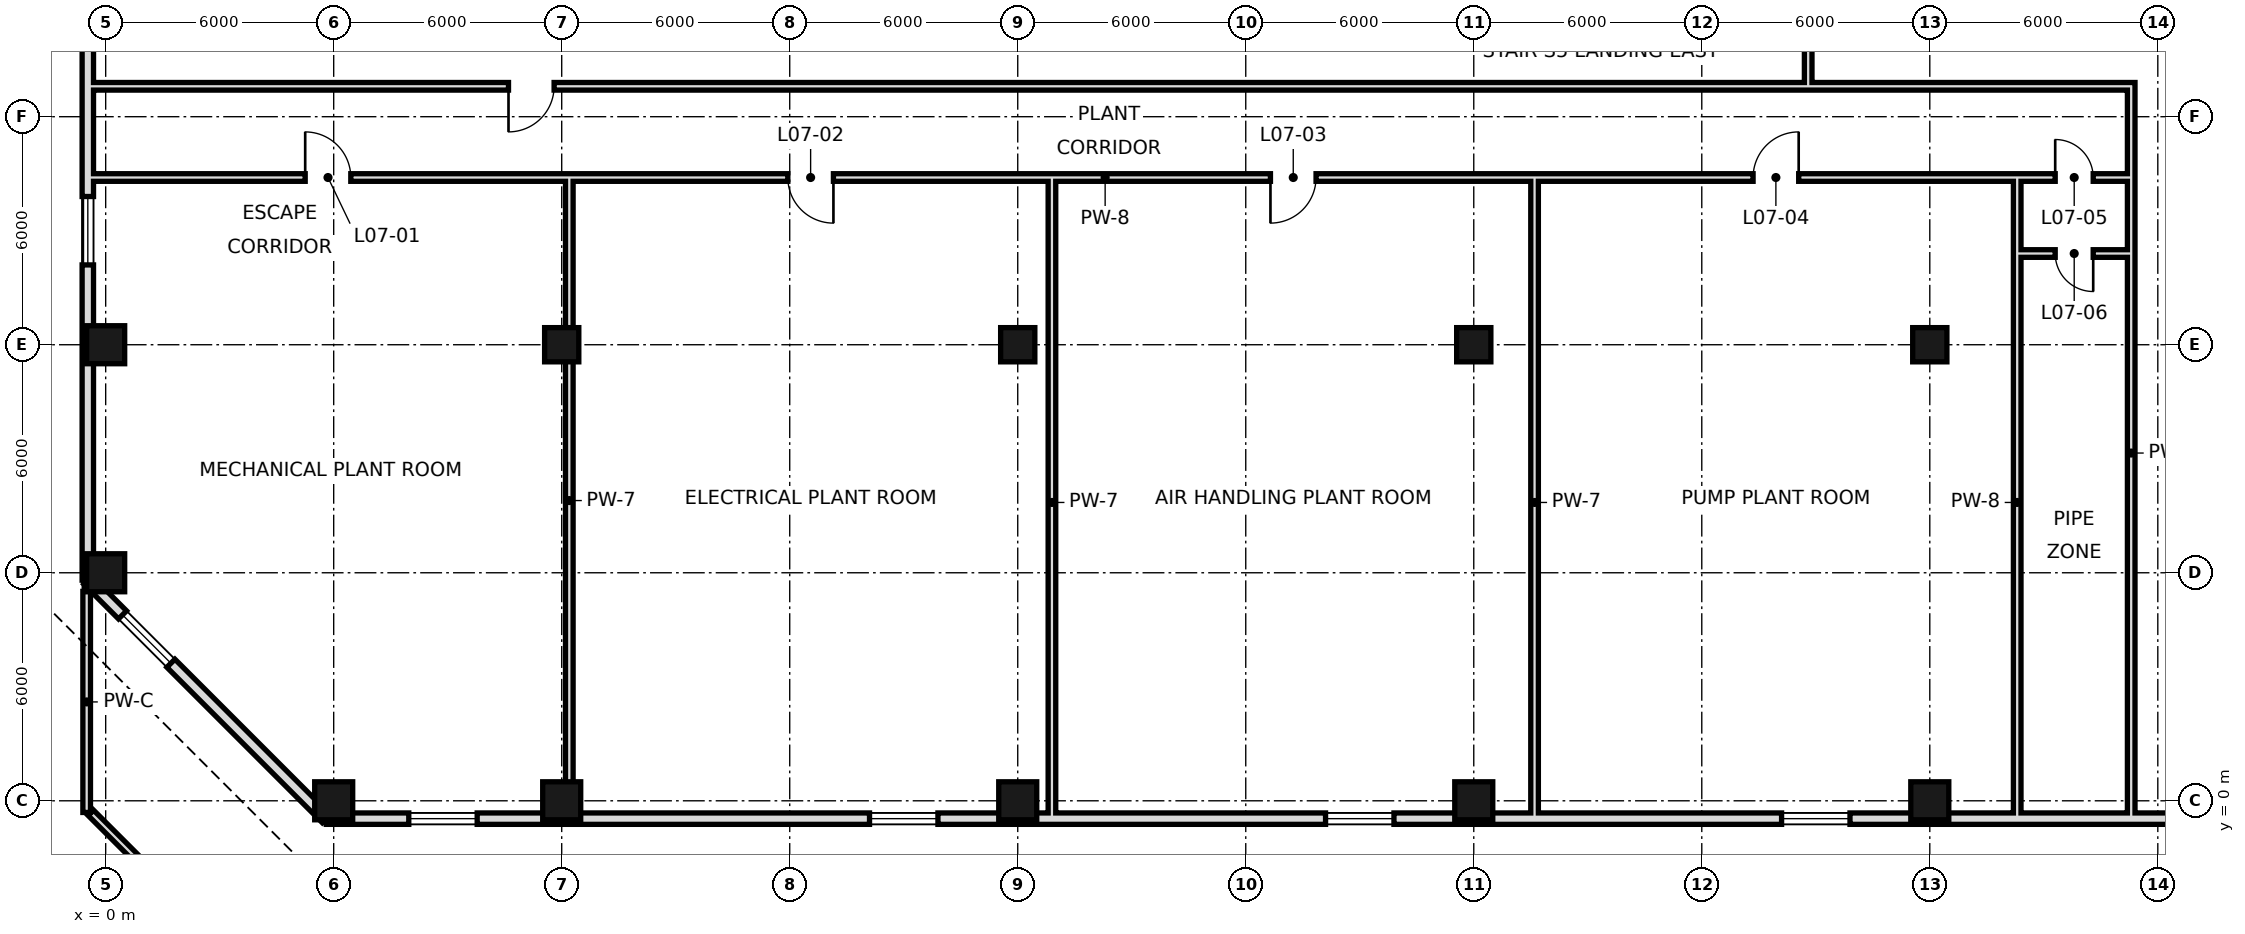
"""IFC4 building model, lengths in metres.
Left out: names, types, materials, properties, quantities, classifications, styles, units other than length and angle.
Written with IfcOpenShell. Run it as: python <this file> out.ifc"""

import sys

from ifc_helpers import new_model, si_unit, direction, frame, frame_2d, origin, origin_2d, place, context, subcontext, project, spatial, rectangle, hollow_rectangle, extrude, element, fill, save


model = new_model("IFC4")
c1 = context("Model", 3, precision=1e-05, world=origin(), true_north=direction((0.0, 1.0)))
c2 = subcontext(c1, "Body", "Model", "MODEL_VIEW")
j1 = project(units=[si_unit("LENGTHUNIT", "METRE"), si_unit("PLANEANGLEUNIT", "RADIAN")], contexts=[c1])
p1 = place(None, origin())
s1 = spatial("IfcSite", under=j1, at=p1, CompositionType="ELEMENT")
p2 = place(p1, origin())
s2 = spatial("IfcBuilding", under=s1, at=p2, CompositionType="ELEMENT")
p3 = place(p2, frame((0.0, 0.0, 44.4)))
s3 = spatial("IfcBuildingStorey", under=s2, at=p3, CompositionType="ELEMENT", Elevation=44.4)
for number, where, z_axis, x_axis in (
    (1, (0.0, 6.0, 0.0), (0.0, 0.0, 1.0), (1.0, 0.0, 0.0)),
    (2, (0.0, 12.0, 0.0), (0.0, 0.0, 1.0), (1.0, 0.0, 0.0)),
    (3, (6.0, 0.0, 0.0), (0.0, 0.0, 1.0), (1.0, 0.0, 0.0)),
    (4, (12.0, 0.0, 0.0), (0.0, 0.0, 1.0), (1.0, 0.0, 0.0)),
):
    element("IfcColumn", number, at=place(p3, frame(where, z_axis=z_axis, x_axis=x_axis)), inside=s3, PredefinedType="COLUMN", context=c2, shape_type="SweptSolid", body=[
        extrude(hollow_rectangle(XDim=1.0, YDim=1.0, WallThickness=0.05, at=origin_2d()), origin(), (0.0, 0.0, 1.0), 5.4),
    ])
p4 = place(p3, frame((12.0, 12.0, 0.0), z_axis=(0.0, 0.0, 1.0), x_axis=(1.0, 0.0, 0.0)))
e5 = element("IfcColumn", 5, at=p4, inside=s3, PredefinedType="COLUMN", context=c2, shape_type="SweptSolid", body=[
    extrude(hollow_rectangle(XDim=0.9, YDim=0.9, WallThickness=0.045, at=origin_2d()), origin(), (0.0, 0.0, 1.0), 5.4),
])
p5 = place(p3, frame((24.0, 0.0, 0.0), z_axis=(0.0, 0.0, 1.0), x_axis=(1.0, 0.0, 0.0)))
e6 = element("IfcColumn", 6, at=p5, inside=s3, PredefinedType="COLUMN", context=c2, shape_type="SweptSolid", body=[
    extrude(hollow_rectangle(XDim=1.0, YDim=1.0, WallThickness=0.05, at=origin_2d()), origin(), (0.0, 0.0, 1.0), 5.4),
])
p6 = place(p3, frame((24.0, 12.0, 0.0), z_axis=(0.0, 0.0, 1.0), x_axis=(1.0, 0.0, 0.0)))
e7 = element("IfcColumn", 7, at=p6, inside=s3, PredefinedType="COLUMN", context=c2, shape_type="SweptSolid", body=[
    extrude(hollow_rectangle(XDim=0.9, YDim=0.9, WallThickness=0.045, at=origin_2d()), origin(), (0.0, 0.0, 1.0), 5.4),
])
p7 = place(p3, frame((36.0, 0.0, 0.0), z_axis=(0.0, 0.0, 1.0), x_axis=(1.0, 0.0, 0.0)))
e8 = element("IfcColumn", 8, at=p7, inside=s3, PredefinedType="COLUMN", context=c2, shape_type="SweptSolid", body=[
    extrude(hollow_rectangle(XDim=1.0, YDim=1.0, WallThickness=0.05, at=origin_2d()), origin(), (0.0, 0.0, 1.0), 5.4),
])
p8 = place(p3, frame((36.0, 12.0, 0.0), z_axis=(0.0, 0.0, 1.0), x_axis=(1.0, 0.0, 0.0)))
e9 = element("IfcColumn", 9, at=p8, inside=s3, PredefinedType="COLUMN", context=c2, shape_type="SweptSolid", body=[
    extrude(hollow_rectangle(XDim=0.9, YDim=0.9, WallThickness=0.045, at=origin_2d()), origin(), (0.0, 0.0, 1.0), 5.4),
])
p9 = place(p3, frame((48.0, 0.0, 0.0), z_axis=(0.0, 0.0, 1.0), x_axis=(1.0, 0.0, 0.0)))
e10 = element("IfcColumn", 10, at=p9, inside=s3, PredefinedType="COLUMN", context=c2, shape_type="SweptSolid", body=[
    extrude(hollow_rectangle(XDim=1.0, YDim=1.0, WallThickness=0.05, at=origin_2d()), origin(), (0.0, 0.0, 1.0), 5.4),
])
p10 = place(p3, frame((48.0, 12.0, 0.0), z_axis=(0.0, 0.0, 1.0), x_axis=(1.0, 0.0, 0.0)))
e11 = element("IfcColumn", 11, at=p10, inside=s3, PredefinedType="COLUMN", context=c2, shape_type="SweptSolid", body=[
    extrude(hollow_rectangle(XDim=0.9, YDim=0.9, WallThickness=0.045, at=origin_2d()), origin(), (0.0, 0.0, 1.0), 5.4),
])
p11 = place(p3, frame((5.805, -0.47, 0.0), z_axis=(0.0, 0.0, 1.0), x_axis=(1.0, 0.0, 0.0)))
e12 = element("IfcWall", 12, at=p11, inside=s3, PredefinedType="SOLIDWALL", context=c2, shape_type="SweptSolid", body=[
    extrude(rectangle(XDim=54.389, YDim=0.3, at=frame_2d((27.195, 0.0))), origin(), (0.0, 0.0, 1.0), 5.22),
])
p12 = place(p11, frame((2.17, 0.0, 0.9)))
e13 = element("IfcOpeningElement", 13, at=p12, cuts=e12, PredefinedType="OPENING", context=c2, shape_type="SweptSolid", body=[
    extrude(rectangle(XDim=1.8, YDim=1.5, at=frame_2d((0.9, 0.75))), frame((0.0, 0.16, 0.0), z_axis=(0.0, -1.0, 0.0), x_axis=(1.0, 0.0, 0.0)), (0.0, 0.0, 1.0), 0.32),
])
p13 = place(p11, frame((14.295, 0.0, 0.9)))
e14 = element("IfcOpeningElement", 14, at=p13, cuts=e12, PredefinedType="OPENING", context=c2, shape_type="SweptSolid", body=[
    extrude(rectangle(XDim=1.8, YDim=1.5, at=frame_2d((0.9, 0.75))), frame((0.0, 0.16, 0.0), z_axis=(0.0, -1.0, 0.0), x_axis=(1.0, 0.0, 0.0)), (0.0, 0.0, 1.0), 0.32),
])
p14 = place(p11, frame((26.295, 0.0, 0.9)))
e15 = element("IfcOpeningElement", 15, at=p14, cuts=e12, PredefinedType="OPENING", context=c2, shape_type="SweptSolid", body=[
    extrude(rectangle(XDim=1.8, YDim=1.5, at=frame_2d((0.9, 0.75))), frame((0.0, 0.16, 0.0), z_axis=(0.0, -1.0, 0.0), x_axis=(1.0, 0.0, 0.0)), (0.0, 0.0, 1.0), 0.32),
])
p15 = place(p11, frame((38.295, 0.0, 0.9)))
e16 = element("IfcOpeningElement", 16, at=p15, cuts=e12, PredefinedType="OPENING", context=c2, shape_type="SweptSolid", body=[
    extrude(rectangle(XDim=1.8, YDim=1.5, at=frame_2d((0.9, 0.75))), frame((0.0, 0.16, 0.0), z_axis=(0.0, -1.0, 0.0), x_axis=(1.0, 0.0, 0.0)), (0.0, 0.0, 1.0), 0.32),
])
p16 = place(p11, frame((50.419, 0.0, 0.9)))
e17 = element("IfcOpeningElement", 17, at=p16, cuts=e12, PredefinedType="OPENING", context=c2, shape_type="SweptSolid", body=[
    extrude(rectangle(XDim=1.8, YDim=1.5, at=frame_2d((0.9, 0.75))), frame((0.0, 0.16, 0.0), z_axis=(0.0, -1.0, 0.0), x_axis=(1.0, 0.0, 0.0)), (0.0, 0.0, 1.0), 0.32),
])
p17 = place(p3, frame((-0.47, 42.195, 0.0), z_axis=(0.0, 0.0, 1.0), x_axis=(0.0, -1.0, 0.0)))
e18 = element("IfcWall", 18, at=p17, inside=s3, PredefinedType="SOLIDWALL", context=c2, shape_type="SweptSolid", body=[
    extrude(rectangle(XDim=36.389, YDim=0.3, at=frame_2d((18.195, 0.0))), origin(), (0.0, 0.0, 1.0), 5.22),
])
p18 = place(p17, frame((2.17, 0.0, 0.9)))
e19 = element("IfcOpeningElement", 19, at=p18, cuts=e18, PredefinedType="OPENING", context=c2, shape_type="SweptSolid", body=[
    extrude(rectangle(XDim=1.8, YDim=1.5, at=frame_2d((0.9, 0.75))), frame((0.0, 0.16, 0.0), z_axis=(0.0, -1.0, 0.0), x_axis=(1.0, 0.0, 0.0)), (0.0, 0.0, 1.0), 0.32),
])
p19 = place(p17, frame((14.295, 0.0, 0.9)))
e20 = element("IfcOpeningElement", 20, at=p19, cuts=e18, PredefinedType="OPENING", context=c2, shape_type="SweptSolid", body=[
    extrude(rectangle(XDim=1.8, YDim=1.5, at=frame_2d((0.9, 0.75))), frame((0.0, 0.16, 0.0), z_axis=(0.0, -1.0, 0.0), x_axis=(1.0, 0.0, 0.0)), (0.0, 0.0, 1.0), 0.32),
])
p20 = place(p17, frame((26.295, 0.0, 0.9)))
e21 = element("IfcOpeningElement", 21, at=p20, cuts=e18, PredefinedType="OPENING", context=c2, shape_type="SweptSolid", body=[
    extrude(rectangle(XDim=1.8, YDim=1.5, at=frame_2d((0.9, 0.75))), frame((0.0, 0.16, 0.0), z_axis=(0.0, -1.0, 0.0), x_axis=(1.0, 0.0, 0.0)), (0.0, 0.0, 1.0), 0.32),
])
p21 = place(p3, frame((-0.47, 5.805, 0.0), z_axis=(0.0, 0.0, 1.0), x_axis=(0.707106781187, -0.707106781187, 0.0)))
e22 = element("IfcWall", 22, at=p21, inside=s3, PredefinedType="SOLIDWALL", context=c2, shape_type="SweptSolid", body=[
    extrude(rectangle(XDim=8.875, YDim=0.3, at=frame_2d((4.438, 0.0))), origin(), (0.0, 0.0, 1.0), 5.22),
])
p22 = place(p21, frame((1.292, 0.0, 0.9)))
e23 = element("IfcOpeningElement", 23, at=p22, cuts=e22, PredefinedType="OPENING", context=c2, shape_type="SweptSolid", body=[
    extrude(rectangle(XDim=1.8, YDim=1.5, at=frame_2d((0.9, 0.75))), frame((0.0, 0.16, 0.0), z_axis=(0.0, -1.0, 0.0), x_axis=(1.0, 0.0, 0.0)), (0.0, 0.0, 1.0), 0.32),
])
p23 = place(p3, frame((5.69, -6.397, 0.0), z_axis=(0.0, 0.0, 1.0), x_axis=(-0.707106781187, 0.707106781187, 0.0)))
e24 = element("IfcWall", 24, at=p23, inside=s3, PredefinedType="PARAPET", context=c2, shape_type="SweptSolid", body=[
    extrude(rectangle(XDim=8.61, YDim=0.2, at=frame_2d((4.305, 0.0))), origin(), (0.0, 0.0, 1.0), 1.1),
])
p24 = place(p3, frame((-0.5, -0.307, 0.0), z_axis=(0.0, 0.0, 1.0), x_axis=(0.0, 1.0, 0.0)))
e25 = element("IfcWall", 25, at=p24, inside=s3, PredefinedType="PARAPET", context=c2, shape_type="SweptSolid", body=[
    extrude(rectangle(XDim=5.817, YDim=0.2, at=frame_2d((2.909, 0.0))), origin(), (0.0, 0.0, 1.0), 1.1),
])
p25 = place(p3, frame((12.2, -0.5, 0.0), z_axis=(0.0, 0.0, 1.0), x_axis=(0.0, 1.0, 0.0)))
e26 = element("IfcWall", 26, at=p25, inside=s3, PredefinedType="SOLIDWALL", context=c2, shape_type="SweptSolid", body=[
    extrude(rectangle(XDim=16.8, YDim=0.2, at=frame_2d((8.4, 0.0))), origin(), (0.0, 0.0, 1.0), 4.52),
])
for number, where, z_axis, x_axis in (
    (27, (24.9, -0.6, 0.0), (0.0, 0.0, 1.0), (0.0, 1.0, 0.0)),
    (28, (37.6, -0.6, 0.0), (0.0, 0.0, 1.0), (0.0, 1.0, 0.0)),
):
    element("IfcWall", number, at=place(p3, frame(where, z_axis=z_axis, x_axis=x_axis)), inside=s3, PredefinedType="SOLIDWALL", context=c2, shape_type="SweptSolid", body=[
        extrude(rectangle(XDim=16.9, YDim=0.2, at=frame_2d((8.45, 0.0))), origin(), (0.0, 0.0, 1.0), 4.52),
    ])
p26 = place(p3, frame((44.8, 18.9, 0.0), z_axis=(0.0, 0.0, 1.0), x_axis=(0.0, 1.0, 0.0)))
e29 = element("IfcWall", 29, at=p26, inside=s3, PredefinedType="SOLIDWALL", context=c2, shape_type="SweptSolid", body=[
    extrude(rectangle(XDim=29.7, YDim=0.2, at=frame_2d((14.85, 0.0))), origin(), (0.0, 0.0, 1.0), 4.52),
])
p27 = place(p26, frame((18.3, 0.0, 0.0)))
e30 = element("IfcOpeningElement", 30, at=p27, cuts=e29, PredefinedType="OPENING", context=c2, shape_type="SweptSolid", body=[
    extrude(rectangle(XDim=1.2, YDim=2.4, at=frame_2d((0.6, 1.2))), frame((0.0, 0.11, 0.0), z_axis=(0.0, -1.0, 0.0), x_axis=(1.0, 0.0, 0.0)), (0.0, 0.0, 1.0), 0.22),
])
p28 = place(p3, frame((50.3, -0.6, 0.0), z_axis=(0.0, 0.0, 1.0), x_axis=(0.0, 1.0, 0.0)))
e31 = element("IfcWall", 31, at=p28, inside=s3, PredefinedType="SOLIDWALL", context=c2, shape_type="SweptSolid", body=[
    extrude(rectangle(XDim=16.9, YDim=0.2, at=frame_2d((8.45, 0.0))), origin(), (0.0, 0.0, 1.0), 4.32),
])
p29 = place(p3, frame((53.3, -0.6, 0.0), z_axis=(0.0, 0.0, 1.0), x_axis=(0.0, 1.0, 0.0)))
e32 = element("IfcWall", 32, at=p29, inside=s3, PredefinedType="SOLIDWALL", context=c2, shape_type="SweptSolid", body=[
    extrude(rectangle(XDim=19.5, YDim=0.2, at=frame_2d((9.75, 0.0))), origin(), (0.0, 0.0, 1.0), 4.32),
])
p30 = place(p3, frame((50.4, 14.4, 0.0), z_axis=(0.0, 0.0, 1.0), x_axis=(1.0, 0.0, 0.0)))
e33 = element("IfcWall", 33, at=p30, inside=s3, PredefinedType="SOLIDWALL", context=c2, shape_type="SweptSolid", body=[
    extrude(rectangle(XDim=2.8, YDim=0.2, at=frame_2d((1.4, 0.0))), origin(), (0.0, 0.0, 1.0), 5.22),
])
p31 = place(p30, frame((0.9, 0.0, 0.0)))
e34 = element("IfcOpeningElement", 34, at=p31, cuts=e33, PredefinedType="OPENING", context=c2, shape_type="SweptSolid", body=[
    extrude(rectangle(XDim=1.0, YDim=2.4, at=frame_2d((0.5, 1.2))), frame((0.0, 0.11, 0.0), z_axis=(0.0, -1.0, 0.0), x_axis=(1.0, 0.0, 0.0)), (0.0, 0.0, 1.0), 0.22),
])
p32 = place(p3, frame((-0.6, 16.4, 0.0), z_axis=(0.0, 0.0, 1.0), x_axis=(1.0, 0.0, 0.0)))
e35 = element("IfcWall", 35, at=p32, inside=s3, PredefinedType="SOLIDWALL", context=c2, shape_type="SweptSolid", body=[
    extrude(rectangle(XDim=53.8, YDim=0.2, at=frame_2d((26.9, 0.0))), origin(), (0.0, 0.0, 1.0), 4.52),
])
p33 = place(p32, frame((5.85, 0.0, 0.0)))
e36 = element("IfcOpeningElement", 36, at=p33, cuts=e35, PredefinedType="OPENING", context=c2, shape_type="SweptSolid", body=[
    extrude(rectangle(XDim=1.2, YDim=2.4, at=frame_2d((0.6, 1.2))), frame((0.0, 0.11, 0.0), z_axis=(0.0, -1.0, 0.0), x_axis=(1.0, 0.0, 0.0)), (0.0, 0.0, 1.0), 0.22),
])
p34 = place(p32, frame((18.55, 0.0, 0.0)))
e37 = element("IfcOpeningElement", 37, at=p34, cuts=e35, PredefinedType="OPENING", context=c2, shape_type="SweptSolid", body=[
    extrude(rectangle(XDim=1.2, YDim=2.4, at=frame_2d((0.6, 1.2))), frame((0.0, 0.11, 0.0), z_axis=(0.0, -1.0, 0.0), x_axis=(1.0, 0.0, 0.0)), (0.0, 0.0, 1.0), 0.22),
])
p35 = place(p32, frame((31.25, 0.0, 0.0)))
e38 = element("IfcOpeningElement", 38, at=p35, cuts=e35, PredefinedType="OPENING", context=c2, shape_type="SweptSolid", body=[
    extrude(rectangle(XDim=1.2, YDim=2.4, at=frame_2d((0.6, 1.2))), frame((0.0, 0.11, 0.0), z_axis=(0.0, -1.0, 0.0), x_axis=(1.0, 0.0, 0.0)), (0.0, 0.0, 1.0), 0.22),
])
p36 = place(p32, frame((43.95, 0.0, 0.0)))
e39 = element("IfcOpeningElement", 39, at=p36, cuts=e35, PredefinedType="OPENING", context=c2, shape_type="SweptSolid", body=[
    extrude(rectangle(XDim=1.2, YDim=2.4, at=frame_2d((0.6, 1.2))), frame((0.0, 0.11, 0.0), z_axis=(0.0, -1.0, 0.0), x_axis=(1.0, 0.0, 0.0)), (0.0, 0.0, 1.0), 0.22),
])
p37 = place(p32, frame((51.9, 0.0, 0.0)))
e40 = element("IfcOpeningElement", 40, at=p37, cuts=e35, PredefinedType="OPENING", context=c2, shape_type="SweptSolid", body=[
    extrude(rectangle(XDim=1.0, YDim=2.4, at=frame_2d((0.5, 1.2))), frame((0.0, 0.11, 0.0), z_axis=(0.0, -1.0, 0.0), x_axis=(1.0, 0.0, 0.0)), (0.0, 0.0, 1.0), 0.22),
])
p38 = place(p3, frame((-0.6, 18.8, 0.0), z_axis=(0.0, 0.0, 1.0), x_axis=(1.0, 0.0, 0.0)))
e41 = element("IfcWall", 41, at=p38, inside=s3, PredefinedType="SOLIDWALL", context=c2, shape_type="SweptSolid", body=[
    extrude(rectangle(XDim=53.8, YDim=0.2, at=frame_2d((26.9, 0.0))), origin(), (0.0, 0.0, 1.0), 4.52),
])
p39 = place(p38, frame((11.2, 0.0, 0.0)))
e42 = element("IfcOpeningElement", 42, at=p39, cuts=e41, PredefinedType="OPENING", context=c2, shape_type="SweptSolid", body=[
    extrude(rectangle(XDim=1.2, YDim=2.4, at=frame_2d((0.6, 1.2))), frame((0.0, 0.11, 0.0), z_axis=(0.0, -1.0, 0.0), x_axis=(1.0, 0.0, 0.0)), (0.0, 0.0, 1.0), 0.22),
])
p40 = place(p12, origin())
e43 = element("IfcWindow", 43, at=p40, inside=s3, PartitioningType="SINGLE_PANEL", PredefinedType="WINDOW", context=c2, shape_type="SweptSolid", body=[
    extrude(rectangle(XDim=1.8, YDim=1.5, at=frame_2d((0.9, 0.75))), frame((0.0, 0.03, 0.0), z_axis=(0.0, -1.0, 0.0), x_axis=(1.0, 0.0, 0.0)), (0.0, 0.0, 1.0), 0.06),
])
fill(e13, e43)
p41 = place(p13, origin())
e44 = element("IfcWindow", 44, at=p41, inside=s3, PartitioningType="SINGLE_PANEL", PredefinedType="WINDOW", context=c2, shape_type="SweptSolid", body=[
    extrude(rectangle(XDim=1.8, YDim=1.5, at=frame_2d((0.9, 0.75))), frame((0.0, 0.03, 0.0), z_axis=(0.0, -1.0, 0.0), x_axis=(1.0, 0.0, 0.0)), (0.0, 0.0, 1.0), 0.06),
])
fill(e14, e44)
p42 = place(p14, origin())
e45 = element("IfcWindow", 45, at=p42, inside=s3, PartitioningType="SINGLE_PANEL", PredefinedType="WINDOW", context=c2, shape_type="SweptSolid", body=[
    extrude(rectangle(XDim=1.8, YDim=1.5, at=frame_2d((0.9, 0.75))), frame((0.0, 0.03, 0.0), z_axis=(0.0, -1.0, 0.0), x_axis=(1.0, 0.0, 0.0)), (0.0, 0.0, 1.0), 0.06),
])
fill(e15, e45)
p43 = place(p15, origin())
e46 = element("IfcWindow", 46, at=p43, inside=s3, PartitioningType="SINGLE_PANEL", PredefinedType="WINDOW", context=c2, shape_type="SweptSolid", body=[
    extrude(rectangle(XDim=1.8, YDim=1.5, at=frame_2d((0.9, 0.75))), frame((0.0, 0.03, 0.0), z_axis=(0.0, -1.0, 0.0), x_axis=(1.0, 0.0, 0.0)), (0.0, 0.0, 1.0), 0.06),
])
fill(e16, e46)
p44 = place(p20, origin())
e47 = element("IfcWindow", 47, at=p44, inside=s3, PartitioningType="SINGLE_PANEL", PredefinedType="WINDOW", context=c2, shape_type="SweptSolid", body=[
    extrude(rectangle(XDim=1.8, YDim=1.5, at=frame_2d((0.9, 0.75))), frame((0.0, 0.03, 0.0), z_axis=(0.0, -1.0, 0.0), x_axis=(1.0, 0.0, 0.0)), (0.0, 0.0, 1.0), 0.06),
])
fill(e21, e47)
p45 = place(p22, origin())
e48 = element("IfcWindow", 48, at=p45, inside=s3, PartitioningType="SINGLE_PANEL", PredefinedType="WINDOW", context=c2, shape_type="SweptSolid", body=[
    extrude(rectangle(XDim=1.8, YDim=1.5, at=frame_2d((0.9, 0.75))), frame((0.0, 0.03, 0.0), z_axis=(0.0, -1.0, 0.0), x_axis=(1.0, 0.0, 0.0)), (0.0, 0.0, 1.0), 0.06),
])
fill(e23, e48)
p46 = place(p33, origin())
e49 = element("IfcDoor", 49, at=p46, inside=s3, OperationType="SINGLE_SWING_LEFT", PredefinedType="DOOR", context=c2, shape_type="SweptSolid", body=[
    extrude(rectangle(XDim=1.2, YDim=2.4, at=frame_2d((0.6, 1.2))), frame((0.0, 0.025, 0.0), z_axis=(0.0, -1.0, 0.0), x_axis=(1.0, 0.0, 0.0)), (0.0, 0.0, 1.0), 0.05),
])
fill(e36, e49)
p47 = place(p34, origin())
e50 = element("IfcDoor", 50, at=p47, inside=s3, OperationType="SINGLE_SWING_RIGHT", PredefinedType="DOOR", context=c2, shape_type="SweptSolid", body=[
    extrude(rectangle(XDim=1.2, YDim=2.4, at=frame_2d((0.6, 1.2))), frame((0.0, 0.025, 0.0), z_axis=(0.0, -1.0, 0.0), x_axis=(1.0, 0.0, 0.0)), (0.0, 0.0, 1.0), 0.05),
])
fill(e37, e50)
p48 = place(p35, frame((1.2, 0.0, 0.0), z_axis=(0.0, 0.0, 1.0), x_axis=(-1.0, 0.0, 0.0)))
e51 = element("IfcDoor", 51, at=p48, inside=s3, OperationType="SINGLE_SWING_RIGHT", PredefinedType="DOOR", context=c2, shape_type="SweptSolid", body=[
    extrude(rectangle(XDim=1.2, YDim=2.4, at=frame_2d((0.6, 1.2))), frame((0.0, 0.025, 0.0), z_axis=(0.0, -1.0, 0.0), x_axis=(1.0, 0.0, 0.0)), (0.0, 0.0, 1.0), 0.05),
])
fill(e38, e51)
p49 = place(p36, frame((1.2, 0.0, 0.0), z_axis=(0.0, 0.0, 1.0), x_axis=(-1.0, 0.0, 0.0)))
e52 = element("IfcDoor", 52, at=p49, inside=s3, OperationType="SINGLE_SWING_LEFT", PredefinedType="DOOR", context=c2, shape_type="SweptSolid", body=[
    extrude(rectangle(XDim=1.2, YDim=2.4, at=frame_2d((0.6, 1.2))), frame((0.0, 0.025, 0.0), z_axis=(0.0, -1.0, 0.0), x_axis=(1.0, 0.0, 0.0)), (0.0, 0.0, 1.0), 0.05),
])
fill(e39, e52)
p50 = place(p37, origin())
e53 = element("IfcDoor", 53, at=p50, inside=s3, OperationType="SINGLE_SWING_LEFT", PredefinedType="DOOR", context=c2, shape_type="SweptSolid", body=[
    extrude(rectangle(XDim=1.0, YDim=2.4, at=frame_2d((0.5, 1.2))), frame((0.0, 0.025, 0.0), z_axis=(0.0, -1.0, 0.0), x_axis=(1.0, 0.0, 0.0)), (0.0, 0.0, 1.0), 0.05),
])
fill(e40, e53)
p51 = place(p31, origin())
e54 = element("IfcDoor", 54, at=p51, inside=s3, OperationType="SINGLE_SWING_RIGHT", PredefinedType="DOOR", context=c2, shape_type="SweptSolid", body=[
    extrude(rectangle(XDim=1.0, YDim=2.4, at=frame_2d((0.5, 1.2))), frame((0.0, 0.025, 0.0), z_axis=(0.0, -1.0, 0.0), x_axis=(1.0, 0.0, 0.0)), (0.0, 0.0, 1.0), 0.05),
])
fill(e34, e54)
p52 = place(p39, frame((1.2, 0.0, 0.0), z_axis=(0.0, 0.0, 1.0), x_axis=(-1.0, 0.0, 0.0)))
e55 = element("IfcDoor", 55, at=p52, inside=s3, OperationType="SINGLE_SWING_RIGHT", PredefinedType="DOOR", context=c2, shape_type="SweptSolid", body=[
    extrude(rectangle(XDim=1.2, YDim=2.4, at=frame_2d((0.6, 1.2))), frame((0.0, 0.025, 0.0), z_axis=(0.0, -1.0, 0.0), x_axis=(1.0, 0.0, 0.0)), (0.0, 0.0, 1.0), 0.05),
])
fill(e42, e55)
save(model, sys.argv[1])
